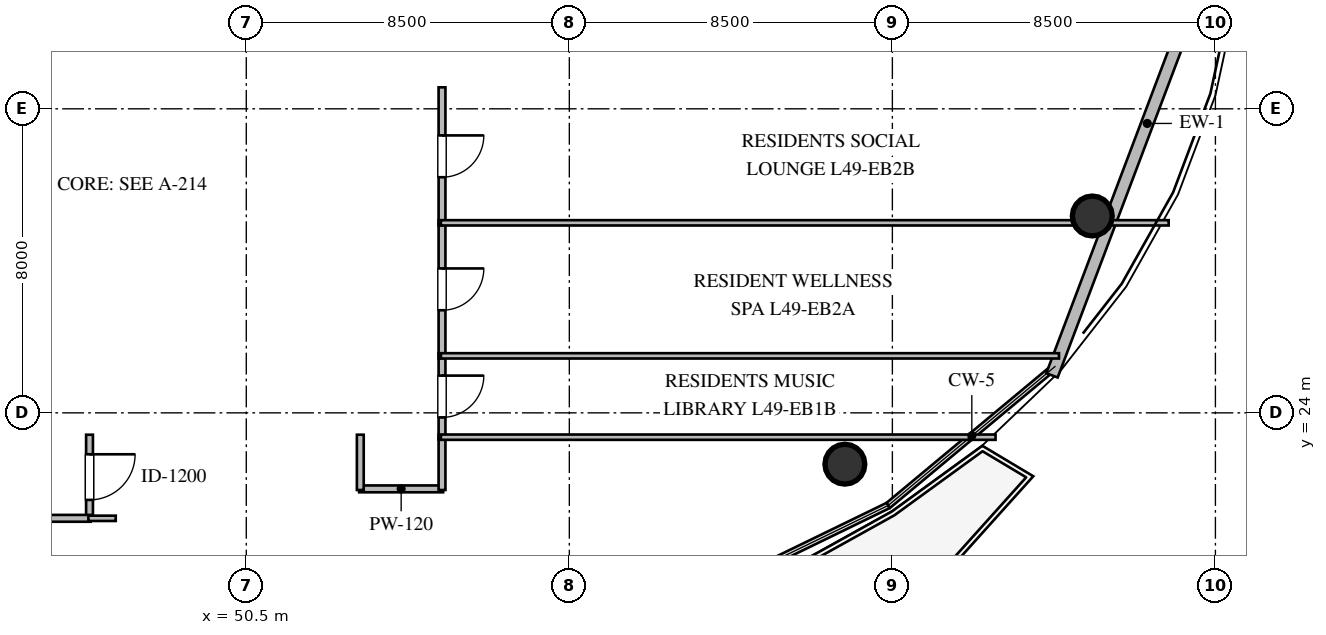
"""IFC4 building model, lengths in metres.
Left out: names, types, materials, properties, quantities, classifications, styles, units other than length and angle.
Written with IfcOpenShell. Run it as: python <this file> out.ifc"""

import sys

from ifc_helpers import new_model, si_unit, direction, frame, frame_2d, origin, origin_2d, place, context, subcontext, project, spatial, rectangle, circle, extrude, element, fill, save


model = new_model("IFC4")
c1 = context("Model", 3, precision=1e-05, world=origin(), true_north=direction((0.0, 1.0)))
c2 = subcontext(c1, "Body", "Model", "MODEL_VIEW")
j1 = project(units=[si_unit("LENGTHUNIT", "METRE"), si_unit("PLANEANGLEUNIT", "RADIAN")], contexts=[c1])
p1 = place(None, origin())
s1 = spatial("IfcSite", under=j1, at=p1, CompositionType="ELEMENT")
p2 = place(p1, origin())
s2 = spatial("IfcBuilding", under=s1, at=p2, CompositionType="ELEMENT")
p3 = place(p2, frame((0.0, 0.0, 187.2)))
s3 = spatial("IfcBuildingStorey", under=s2, at=p3, CompositionType="ELEMENT", Elevation=187.2)
for number, where, z_axis, x_axis in (
    (1, (66.25, 22.65, -0.24), (0.0, 0.0, 1.0), (1.0, 0.0, 0.0)),
    (2, (72.76, 29.18, -0.24), (0.0, 0.0, 1.0), (1.0, 0.0, 0.0)),
):
    element("IfcColumn", number, at=place(p3, frame(where, z_axis=z_axis, x_axis=x_axis)), inside=s3, PredefinedType="COLUMN", context=c2, shape_type="SweptSolid", body=[
        extrude(circle(Radius=0.525, at=origin_2d()), origin(), (0.0, 0.0, 1.0), 3.84),
    ])
p4 = place(p3, frame((76.712, 38.243, 0.0), z_axis=(0.0, 0.0, 1.0), x_axis=(-0.353659523244, -0.935374225441, 0.0)))
e3 = element("IfcWall", 3, at=p4, inside=s3, PredefinedType="STANDARD", context=c2, shape_type="SweptSolid", body=[
    extrude(rectangle(XDim=14.172, YDim=0.32, at=frame_2d((7.086, 0.0))), origin(), (0.0, 0.0, 1.0), 3.28),
])
p5 = place(p3, frame((46.375, 23.425, 0.0), z_axis=(0.0, 0.0, 1.0), x_axis=(0.0, -1.0, 0.0)))
e4 = element("IfcWall", 4, at=p5, inside=s3, PredefinedType="PARTITIONING", context=c2, shape_type="SweptSolid", body=[
    extrude(rectangle(XDim=2.23, YDim=0.18, at=frame_2d((1.115, 0.0))), origin(), (0.0, 0.0, 1.0), 3.28),
])
p6 = place(p5, frame((0.515, 0.0, 0.0)))
e5 = element("IfcOpeningElement", 5, at=p6, cuts=e4, PredefinedType="OPENING", context=c2, shape_type="SweptSolid", body=[
    extrude(rectangle(XDim=1.2, YDim=2.15, at=frame_2d((0.6, 1.075))), frame((0.0, 0.1, 0.0), z_axis=(0.0, -1.0, 0.0), x_axis=(1.0, 0.0, 0.0)), (0.0, 0.0, 1.0), 0.2),
])
p7 = place(p3, frame((55.68, 22.0, 0.0), z_axis=(0.0, 0.0, 1.0), x_axis=(-1.0, 0.0, 0.0)))
e6 = element("IfcWall", 6, at=p7, inside=s3, PredefinedType="PARTITIONING", context=c2, shape_type="SweptSolid", body=[
    extrude(rectangle(XDim=2.21, YDim=0.18, at=frame_2d((1.105, 0.0))), origin(), (0.0, 0.0, 1.0), 3.28),
])
for number, where, z_axis, x_axis in (
    (7, (55.65, 23.425, 0.0), (0.0, 0.0, 1.0), (0.0, -1.0, 0.0)),
    (8, (53.5, 21.97, 0.0), (0.0, 0.0, 1.0), (0.0, 1.0, 0.0)),
):
    element("IfcWall", number, at=place(p3, frame(where, z_axis=z_axis, x_axis=x_axis)), inside=s3, PredefinedType="PARTITIONING", context=c2, shape_type="SweptSolid", body=[
        extrude(rectangle(XDim=1.455, YDim=0.18, at=frame_2d((0.728, 0.0))), origin(), (0.0, 0.0, 1.0), 3.28),
    ])
p8 = place(p3, frame((55.65, 25.565, 0.0), z_axis=(0.0, 0.0, 1.0), x_axis=(0.0, -1.0, 0.0)))
e9 = element("IfcWall", 9, at=p8, inside=s3, PredefinedType="PARTITIONING", context=c2, shape_type="SweptSolid", body=[
    extrude(rectangle(XDim=2.27, YDim=0.18, at=frame_2d((1.135, 0.0))), origin(), (0.0, 0.0, 1.0), 3.28),
])
p9 = place(p8, frame((0.585, 0.0, 0.0)))
e10 = element("IfcOpeningElement", 10, at=p9, cuts=e9, PredefinedType="OPENING", context=c2, shape_type="SweptSolid", body=[
    extrude(rectangle(XDim=1.1, YDim=2.1, at=frame_2d((0.55, 1.05))), frame((0.0, 0.1, 0.0), z_axis=(0.0, -1.0, 0.0), x_axis=(1.0, 0.0, 0.0)), (0.0, 0.0, 1.0), 0.2),
])
p10 = place(p3, frame((55.65, 29.065, 0.0), z_axis=(0.0, 0.0, 1.0), x_axis=(0.0, -1.0, 0.0)))
e11 = element("IfcWall", 11, at=p10, inside=s3, PredefinedType="PARTITIONING", context=c2, shape_type="SweptSolid", body=[
    extrude(rectangle(XDim=3.63, YDim=0.18, at=frame_2d((1.815, 0.0))), origin(), (0.0, 0.0, 1.0), 3.28),
])
p11 = place(p10, frame((1.265, 0.0, 0.0)))
e12 = element("IfcOpeningElement", 12, at=p11, cuts=e11, PredefinedType="OPENING", context=c2, shape_type="SweptSolid", body=[
    extrude(rectangle(XDim=1.1, YDim=2.1, at=frame_2d((0.55, 1.05))), frame((0.0, 0.1, 0.0), z_axis=(0.0, -1.0, 0.0), x_axis=(1.0, 0.0, 0.0)), (0.0, 0.0, 1.0), 0.2),
])
p12 = place(p3, frame((55.65, 32.565, 0.0), z_axis=(0.0, 0.0, 1.0), x_axis=(0.0, -1.0, 0.0)))
e13 = element("IfcWall", 13, at=p12, inside=s3, PredefinedType="PARTITIONING", context=c2, shape_type="SweptSolid", body=[
    extrude(rectangle(XDim=3.63, YDim=0.18, at=frame_2d((1.815, 0.0))), origin(), (0.0, 0.0, 1.0), 3.28),
])
p13 = place(p12, frame((1.265, 0.0, 0.0)))
e14 = element("IfcOpeningElement", 14, at=p13, cuts=e13, PredefinedType="OPENING", context=c2, shape_type="SweptSolid", body=[
    extrude(rectangle(XDim=1.1, YDim=2.1, at=frame_2d((0.55, 1.05))), frame((0.0, 0.1, 0.0), z_axis=(0.0, -1.0, 0.0), x_axis=(1.0, 0.0, 0.0)), (0.0, 0.0, 1.0), 0.2),
])
p14 = place(p3, frame((46.405, 21.225, 0.0), z_axis=(0.0, 0.0, 1.0), x_axis=(-1.0, 0.0, 0.0)))
e15 = element("IfcWall", 15, at=p14, inside=s3, PredefinedType="PARTITIONING", context=c2, shape_type="SweptSolid", body=[
    extrude(rectangle(XDim=13.47, YDim=0.18, at=frame_2d((6.735, 0.0))), origin(), (0.0, 0.0, 1.0), 2.916),
])
p15 = place(p14, frame((6.185, 0.0, 0.0)))
e16 = element("IfcOpeningElement", 16, at=p15, cuts=e15, PredefinedType="OPENING", context=c2, shape_type="SweptSolid", body=[
    extrude(rectangle(XDim=1.1, YDim=2.1, at=frame_2d((0.55, 1.05))), frame((0.0, 0.1, 0.0), z_axis=(0.0, -1.0, 0.0), x_axis=(1.0, 0.0, 0.0)), (0.0, 0.0, 1.0), 0.2),
])
p16 = place(p3, frame((55.62, 23.36, 0.0), z_axis=(0.0, 0.0, 1.0), x_axis=(1.0, 0.0, 0.0)))
e17 = element("IfcWall", 17, at=p16, inside=s3, PredefinedType="PARTITIONING", context=c2, shape_type="SweptSolid", body=[
    extrude(rectangle(XDim=14.595, YDim=0.14, at=frame_2d((7.297, 0.0))), origin(), (0.0, 0.0, 1.0), 2.81),
])
p17 = place(p3, frame((47.065, 21.225, 0.0), z_axis=(0.0, 0.0, 1.0), x_axis=(-1.0, 0.0, 0.0)))
e18 = element("IfcWall", 18, at=p17, inside=s3, PredefinedType="PARTITIONING", context=c2, shape_type="SweptSolid", body=[
    extrude(rectangle(XDim=0.72, YDim=0.14, at=frame_2d((0.36, 0.0))), origin(), (0.0, 0.0, 1.0), 2.916),
])
p18 = place(p3, frame((55.62, 25.5, 0.0), z_axis=(0.0, 0.0, 1.0), x_axis=(1.0, 0.0, 0.0)))
e19 = element("IfcWall", 19, at=p18, inside=s3, PredefinedType="PARTITIONING", context=c2, shape_type="SweptSolid", body=[
    extrude(rectangle(XDim=16.264, YDim=0.14, at=frame_2d((8.132, 0.0))), origin(), (0.0, 0.0, 1.0), 2.81),
])
p19 = place(p3, frame((55.62, 29.0, 0.0), z_axis=(0.0, 0.0, 1.0), x_axis=(1.0, 0.0, 0.0)))
e20 = element("IfcWall", 20, at=p19, inside=s3, PredefinedType="PARTITIONING", context=c2, shape_type="SweptSolid", body=[
    extrude(rectangle(XDim=19.15, YDim=0.14, at=frame_2d((9.575, 0.0))), origin(), (0.0, 0.0, 1.0), 2.81),
])
p20 = place(p6, origin())
e21 = element("IfcDoor", 21, at=p20, inside=s3, OperationType="SINGLE_SWING_LEFT", PredefinedType="DOOR", context=c2, shape_type="SweptSolid", body=[
    extrude(rectangle(XDim=1.2, YDim=2.15, at=frame_2d((0.6, 1.075))), frame((0.0, 0.025, 0.0), z_axis=(0.0, -1.0, 0.0), x_axis=(1.0, 0.0, 0.0)), (0.0, 0.0, 1.0), 0.05),
])
fill(e5, e21)
p21 = place(p9, origin())
e22 = element("IfcDoor", 22, at=p21, inside=s3, OperationType="SINGLE_SWING_LEFT", PredefinedType="DOOR", context=c2, shape_type="SweptSolid", body=[
    extrude(rectangle(XDim=1.1, YDim=2.1, at=frame_2d((0.55, 1.05))), frame((0.0, 0.025, 0.0), z_axis=(0.0, -1.0, 0.0), x_axis=(1.0, 0.0, 0.0)), (0.0, 0.0, 1.0), 0.05),
])
fill(e10, e22)
p22 = place(p11, origin())
e23 = element("IfcDoor", 23, at=p22, inside=s3, OperationType="SINGLE_SWING_LEFT", PredefinedType="DOOR", context=c2, shape_type="SweptSolid", body=[
    extrude(rectangle(XDim=1.1, YDim=2.1, at=frame_2d((0.55, 1.05))), frame((0.0, 0.025, 0.0), z_axis=(0.0, -1.0, 0.0), x_axis=(1.0, 0.0, 0.0)), (0.0, 0.0, 1.0), 0.05),
])
fill(e12, e23)
p23 = place(p13, origin())
e24 = element("IfcDoor", 24, at=p23, inside=s3, OperationType="SINGLE_SWING_LEFT", PredefinedType="DOOR", context=c2, shape_type="SweptSolid", body=[
    extrude(rectangle(XDim=1.1, YDim=2.1, at=frame_2d((0.55, 1.05))), frame((0.0, 0.025, 0.0), z_axis=(0.0, -1.0, 0.0), x_axis=(1.0, 0.0, 0.0)), (0.0, 0.0, 1.0), 0.05),
])
fill(e14, e24)
save(model, sys.argv[1])
